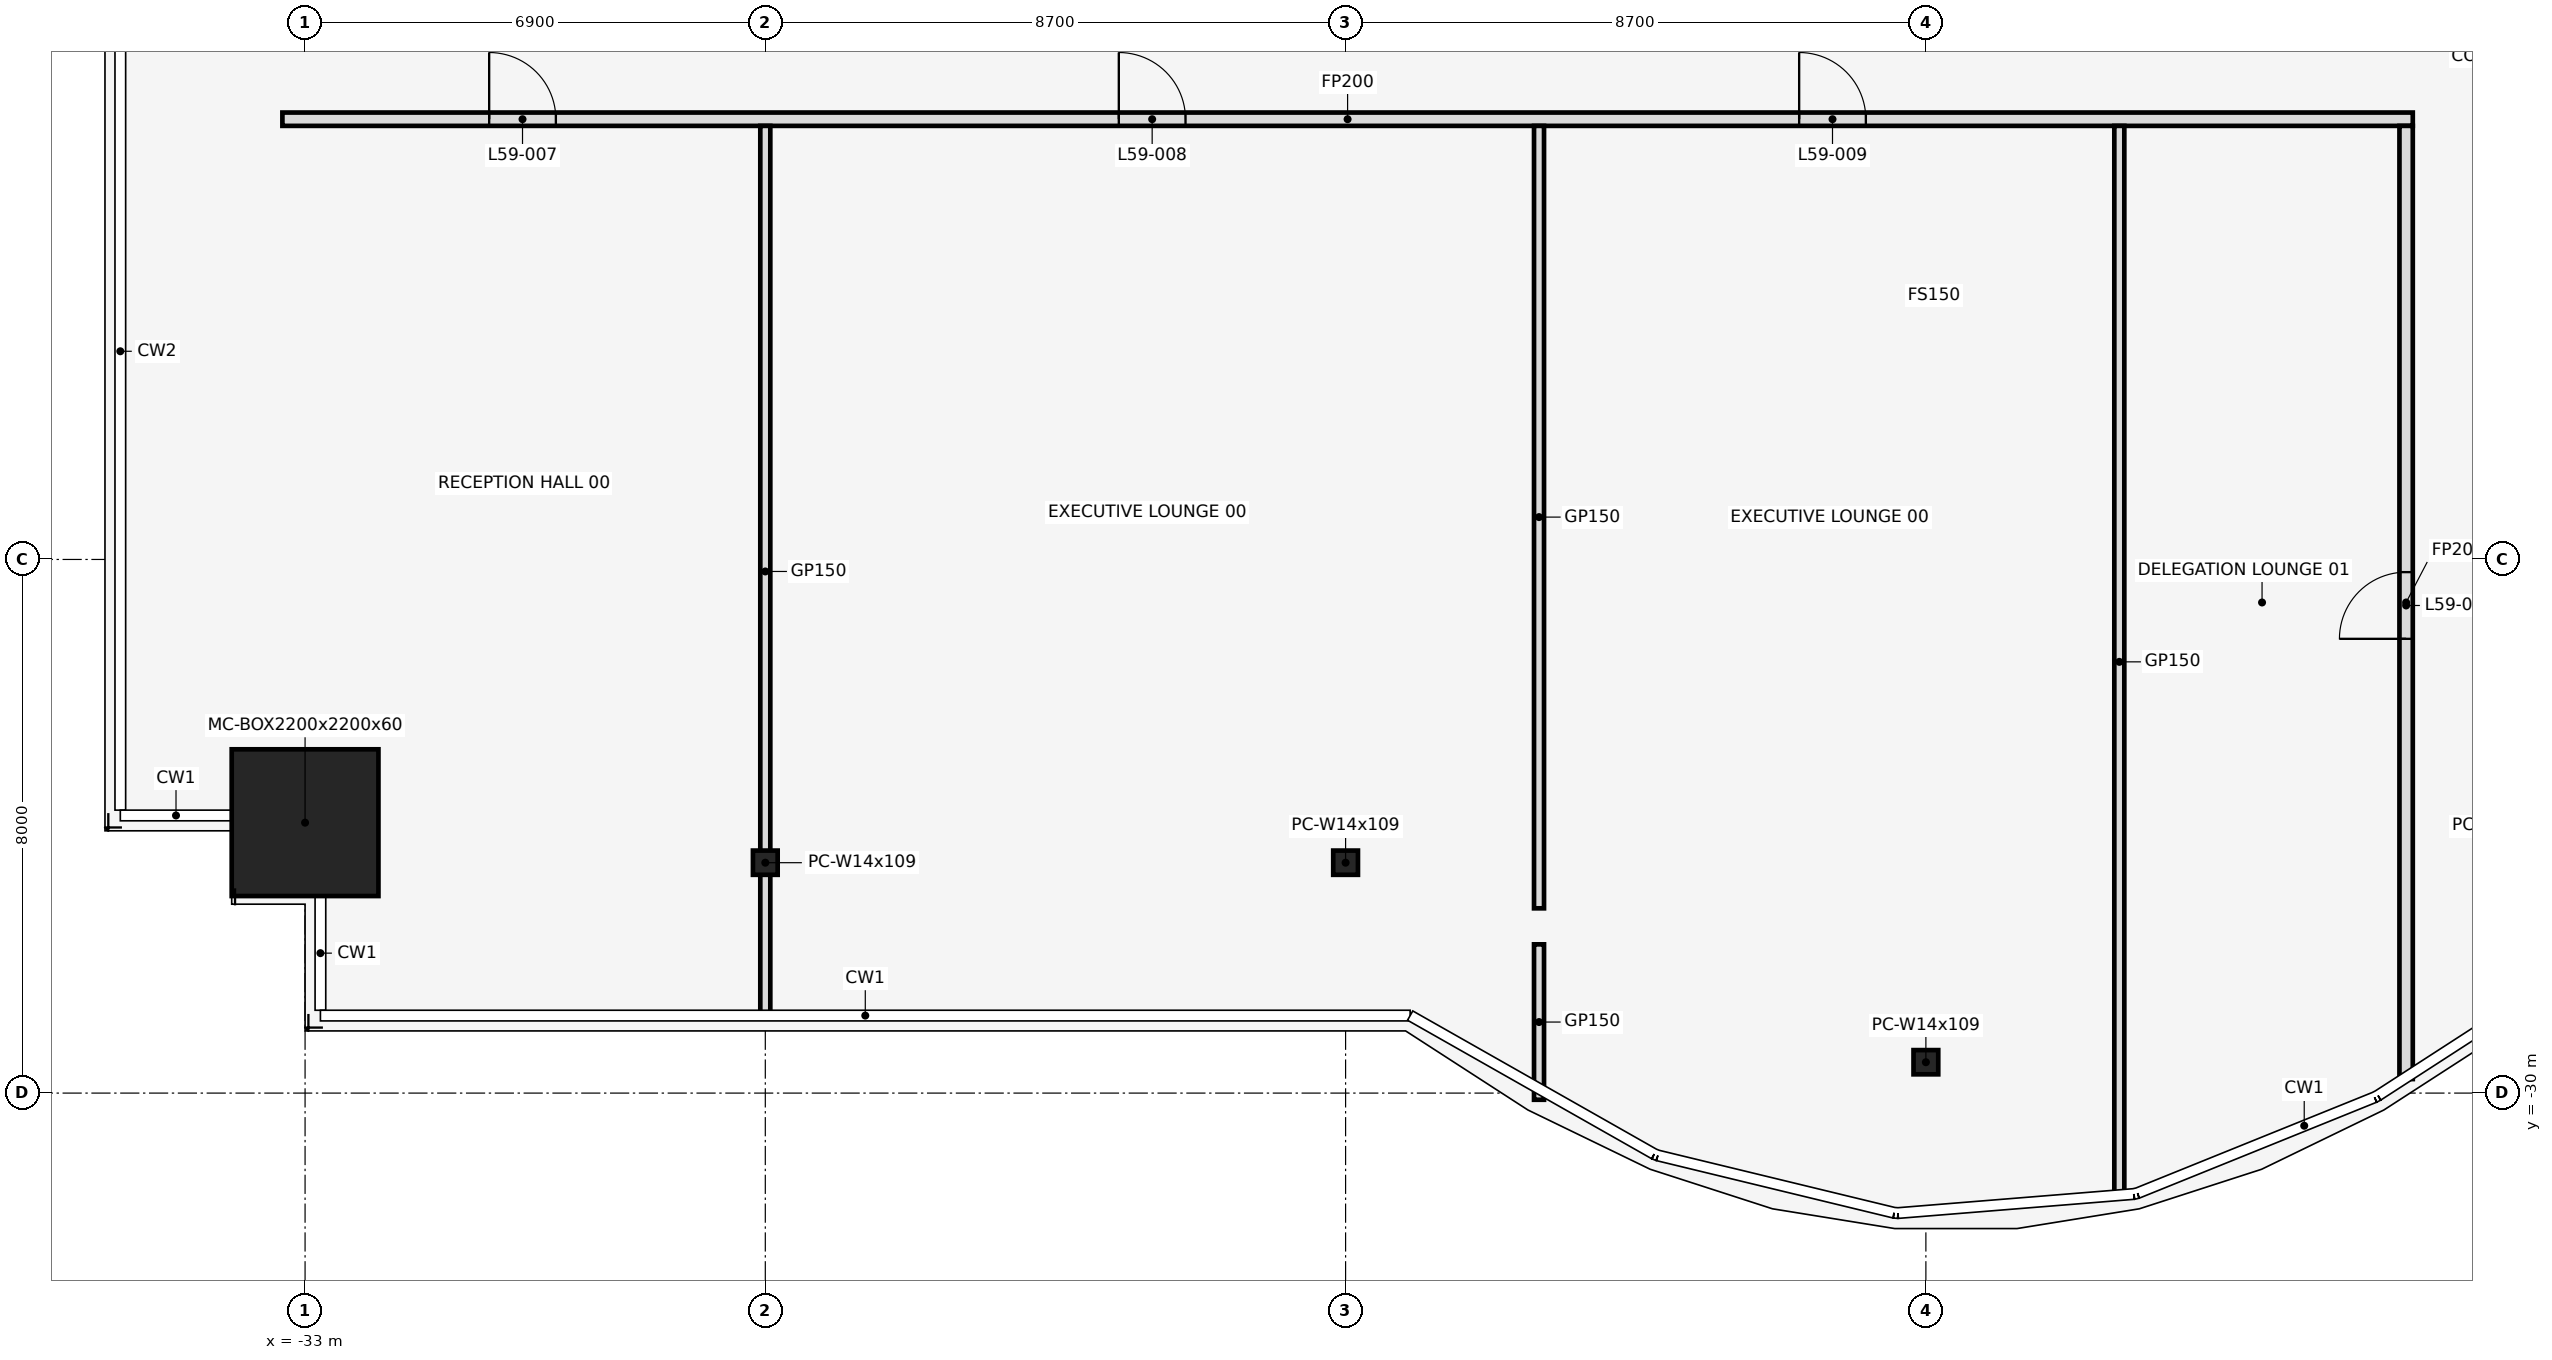
"""IFC4 building model, lengths in metres.
Left out: names, types, materials, properties, quantities, classifications, styles, units other than length and angle.
Written with IfcOpenShell. Run it as: python <this file> out.ifc"""

import sys

from ifc_helpers import new_model, si_unit, direction, frame, frame_2d, origin, origin_2d, place, context, subcontext, project, spatial, rectangle, hollow_rectangle, i_section, extrude, element, fill, save


model = new_model("IFC4")
c1 = context("Model", 3, precision=1e-05, world=origin(), true_north=direction((0.0, 1.0)))
c2 = subcontext(c1, "Body", "Model", "MODEL_VIEW")
j1 = project(units=[si_unit("LENGTHUNIT", "METRE"), si_unit("PLANEANGLEUNIT", "RADIAN")], contexts=[c1])
p1 = place(None, origin())
s1 = spatial("IfcSite", under=j1, at=p1, CompositionType="ELEMENT")
p2 = place(p1, origin())
s2 = spatial("IfcBuilding", under=s1, at=p2, CompositionType="ELEMENT")
p3 = place(p2, frame((0.0, 0.0, 262.4)))
s3 = spatial("IfcBuildingStorey", under=s2, at=p3, CompositionType="ELEMENT", Elevation=262.4)
p4 = place(p3, frame((-33.0, -25.946, 0.0), z_axis=(0.0, 0.0, 1.0), x_axis=(1.0, 0.0, 0.0)))
e1 = element("IfcColumn", 1, at=p4, inside=s3, PredefinedType="COLUMN", context=c2, shape_type="SweptSolid", body=[
    extrude(hollow_rectangle(XDim=2.2, YDim=2.2, WallThickness=0.06, at=origin_2d()), origin(), (0.0, 0.0, 1.0), 4.2),
])
for number, where, z_axis, x_axis in (
    (2, (-26.1, -26.546, 0.0), (0.0, 0.0, 1.0), (1.0, 0.0, 0.0)),
    (3, (-17.4, -26.546, 0.0), (0.0, 0.0, 1.0), (1.0, 0.0, 0.0)),
    (4, (-8.7, -29.537, 0.0), (0.0, 0.0, 1.0), (1.0, 0.0, 0.0)),
):
    element("IfcColumn", number, at=place(p3, frame(where, z_axis=z_axis, x_axis=x_axis)), inside=s3, PredefinedType="COLUMN", context=c2, shape_type="SweptSolid", body=[
        extrude(i_section(OverallWidth=0.371, OverallDepth=0.363, WebThickness=0.013, FlangeThickness=0.022, at=origin_2d()), origin(), (0.0, 0.0, 1.0), 4.2),
    ])
p5 = place(p3, frame((-33.34, -15.4, 0.0), z_axis=(0.0, 0.0, 1.0), x_axis=(1.0, 0.0, 0.0)))
e5 = element("IfcWall", 5, at=p5, inside=s3, PredefinedType="PARTITIONING", context=c2, shape_type="SweptSolid", body=[
    extrude(rectangle(XDim=31.94, YDim=0.2, at=frame_2d((15.97, 0.0))), origin(), (0.0, 0.0, 1.0), 3.118),
])
p6 = place(p5, frame((3.1, 0.0, 0.0)))
e6 = element("IfcOpeningElement", 6, at=p6, cuts=e5, PredefinedType="OPENING", context=c2, shape_type="SweptSolid", body=[
    extrude(rectangle(XDim=1.0, YDim=2.1, at=frame_2d((0.5, 1.05))), frame((0.0, 0.112, 0.0), z_axis=(0.0, -1.0, 0.0), x_axis=(1.0, 0.0, 0.0)), (0.0, 0.0, 1.0), 0.224),
])
p7 = place(p5, frame((12.54, 0.0, 0.0)))
e7 = element("IfcOpeningElement", 7, at=p7, cuts=e5, PredefinedType="OPENING", context=c2, shape_type="SweptSolid", body=[
    extrude(rectangle(XDim=1.0, YDim=2.1, at=frame_2d((0.5, 1.05))), frame((0.0, 0.112, 0.0), z_axis=(0.0, -1.0, 0.0), x_axis=(1.0, 0.0, 0.0)), (0.0, 0.0, 1.0), 0.224),
])
p8 = place(p5, frame((22.74, 0.0, 0.0)))
e8 = element("IfcOpeningElement", 8, at=p8, cuts=e5, PredefinedType="OPENING", context=c2, shape_type="SweptSolid", body=[
    extrude(rectangle(XDim=1.0, YDim=2.1, at=frame_2d((0.5, 1.05))), frame((0.0, 0.112, 0.0), z_axis=(0.0, -1.0, 0.0), x_axis=(1.0, 0.0, 0.0)), (0.0, 0.0, 1.0), 0.224),
])
p9 = place(p3, frame((-26.1, -28.86, 0.0), z_axis=(0.0, 0.0, 1.0), x_axis=(0.0, 1.0, 0.0)))
e9 = element("IfcWall", 9, at=p9, inside=s3, PredefinedType="PARTITIONING", context=c2, shape_type="SweptSolid", body=[
    extrude(rectangle(XDim=13.36, YDim=0.15, at=frame_2d((6.68, 0.0))), origin(), (0.0, 0.0, 1.0), 3.118),
])
p10 = place(p3, frame((-14.5, -30.1, 0.0), z_axis=(0.0, 0.0, 1.0), x_axis=(0.0, 1.0, 0.0)))
e10 = element("IfcWall", 10, at=p10, inside=s3, PredefinedType="PARTITIONING", context=c2, shape_type="SweptSolid", body=[
    extrude(rectangle(XDim=2.33, YDim=0.15, at=frame_2d((1.165, 0.0))), origin(), (0.0, 0.0, 1.0), 3.118),
])
p11 = place(p3, frame((-14.5, -27.23, 0.0), z_axis=(0.0, 0.0, 1.0), x_axis=(0.0, 1.0, 0.0)))
e11 = element("IfcWall", 11, at=p11, inside=s3, PredefinedType="PARTITIONING", context=c2, shape_type="SweptSolid", body=[
    extrude(rectangle(XDim=11.73, YDim=0.15, at=frame_2d((5.865, 0.0))), origin(), (0.0, 0.0, 1.0), 3.118),
])
p12 = place(p3, frame((-5.8, -31.57, 0.0), z_axis=(0.0, 0.0, 1.0), x_axis=(0.0, 1.0, 0.0)))
e12 = element("IfcWall", 12, at=p12, inside=s3, PredefinedType="PARTITIONING", context=c2, shape_type="SweptSolid", body=[
    extrude(rectangle(XDim=16.07, YDim=0.15, at=frame_2d((8.035, 0.0))), origin(), (0.0, 0.0, 1.0), 3.118),
])
p13 = place(p3, frame((-1.5, -29.79, 0.0), z_axis=(0.0, 0.0, 1.0), x_axis=(0.0, 1.0, 0.0)))
e13 = element("IfcWall", 13, at=p13, inside=s3, PredefinedType="PARTITIONING", context=c2, shape_type="SweptSolid", body=[
    extrude(rectangle(XDim=14.29, YDim=0.2, at=frame_2d((7.145, 0.0))), origin(), (0.0, 0.0, 1.0), 3.118),
])
p14 = place(p13, frame((6.6, 0.0, 0.0)))
e14 = element("IfcOpeningElement", 14, at=p14, cuts=e13, PredefinedType="OPENING", context=c2, shape_type="SweptSolid", body=[
    extrude(rectangle(XDim=1.0, YDim=2.1, at=frame_2d((0.5, 1.05))), frame((0.0, 0.112, 0.0), z_axis=(0.0, -1.0, 0.0), x_axis=(1.0, 0.0, 0.0)), (0.0, 0.0, 1.0), 0.224),
])
p15 = place(p6, frame((1.0, 0.0, 0.0), z_axis=(0.0, 0.0, 1.0), x_axis=(-1.0, 0.0, 0.0)))
e15 = element("IfcDoor", 15, at=p15, inside=s3, OperationType="SINGLE_SWING_LEFT", PredefinedType="DOOR", context=c2, shape_type="SweptSolid", body=[
    extrude(rectangle(XDim=1.0, YDim=2.1, at=frame_2d((0.5, 1.05))), frame((0.0, 0.025, 0.0), z_axis=(0.0, -1.0, 0.0), x_axis=(1.0, 0.0, 0.0)), (0.0, 0.0, 1.0), 0.05),
])
fill(e6, e15)
p16 = place(p7, frame((1.0, 0.0, 0.0), z_axis=(0.0, 0.0, 1.0), x_axis=(-1.0, 0.0, 0.0)))
e16 = element("IfcDoor", 16, at=p16, inside=s3, OperationType="SINGLE_SWING_RIGHT", PredefinedType="DOOR", context=c2, shape_type="SweptSolid", body=[
    extrude(rectangle(XDim=1.0, YDim=2.1, at=frame_2d((0.5, 1.05))), frame((0.0, 0.025, 0.0), z_axis=(0.0, -1.0, 0.0), x_axis=(1.0, 0.0, 0.0)), (0.0, 0.0, 1.0), 0.05),
])
fill(e7, e16)
p17 = place(p8, frame((1.0, 0.0, 0.0), z_axis=(0.0, 0.0, 1.0), x_axis=(-1.0, 0.0, 0.0)))
e17 = element("IfcDoor", 17, at=p17, inside=s3, OperationType="SINGLE_SWING_RIGHT", PredefinedType="DOOR", context=c2, shape_type="SweptSolid", body=[
    extrude(rectangle(XDim=1.0, YDim=2.1, at=frame_2d((0.5, 1.05))), frame((0.0, 0.025, 0.0), z_axis=(0.0, -1.0, 0.0), x_axis=(1.0, 0.0, 0.0)), (0.0, 0.0, 1.0), 0.05),
])
fill(e8, e17)
p18 = place(p14, origin())
e18 = element("IfcDoor", 18, at=p18, inside=s3, OperationType="SINGLE_SWING_LEFT", PredefinedType="DOOR", context=c2, shape_type="SweptSolid", body=[
    extrude(rectangle(XDim=1.0, YDim=2.1, at=frame_2d((0.5, 1.05))), frame((0.0, 0.025, 0.0), z_axis=(0.0, -1.0, 0.0), x_axis=(1.0, 0.0, 0.0)), (0.0, 0.0, 1.0), 0.05),
])
fill(e14, e18)
save(model, sys.argv[1])
